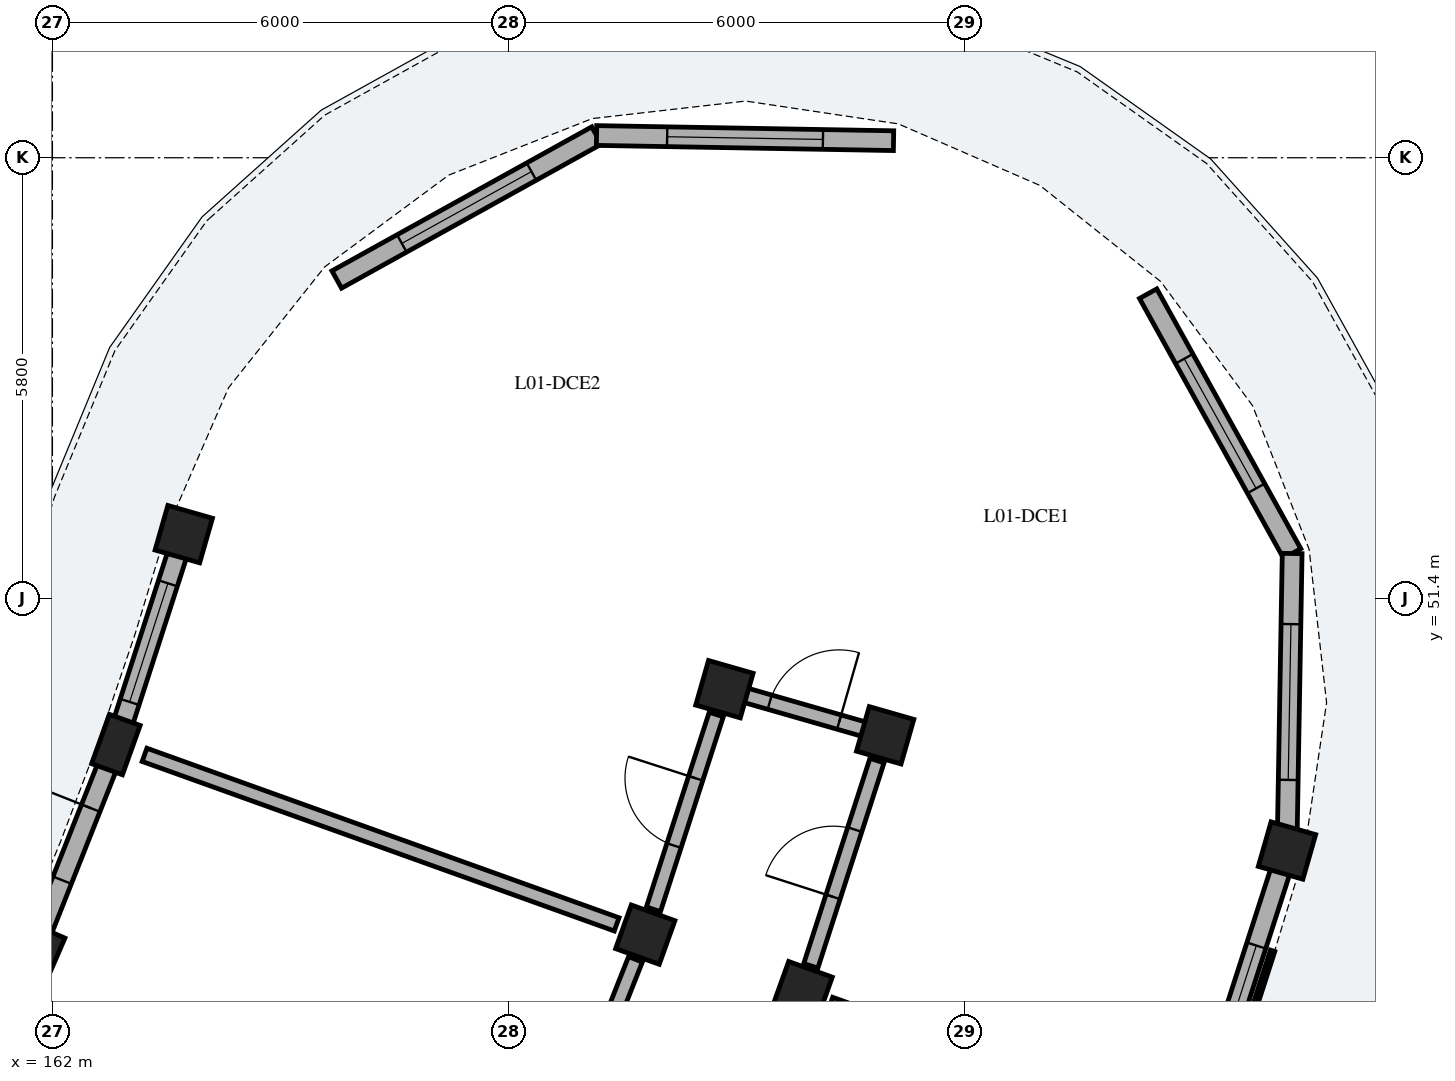
"""IFC4 building model, lengths in metres.
Left out: names, types, materials, properties, quantities, classifications, styles, units other than length and angle.
Written with IfcOpenShell. Run it as: python <this file> out.ifc"""

import sys

from ifc_helpers import new_model, si_unit, direction, frame, frame_2d, origin, origin_2d, place, context, subcontext, project, spatial, rectangle, extrude, element, fill, save


model = new_model("IFC4")
c1 = context("Model", 3, precision=1e-05, world=origin(), true_north=direction((0.0, 1.0)))
c2 = subcontext(c1, "Body", "Model", "MODEL_VIEW")
j1 = project(units=[si_unit("LENGTHUNIT", "METRE"), si_unit("PLANEANGLEUNIT", "RADIAN")], contexts=[c1])
p1 = place(None, origin())
s1 = spatial("IfcSite", under=j1, at=p1, CompositionType="ELEMENT")
p2 = place(p1, origin())
s2 = spatial("IfcBuilding", under=s1, at=p2, CompositionType="ELEMENT")
p3 = place(p2, frame((0.0, 0.0, 4.76)))
s3 = spatial("IfcBuildingStorey", under=s2, at=p3, CompositionType="ELEMENT", Elevation=4.76)
p4 = place(p3, frame((161.763, 46.776, 0.0), z_axis=(0.0, 0.0, 1.0), x_axis=(0.917060074385, -0.398749068925, 0.0)))
e1 = element("IfcColumn", 1, at=p4, inside=s3, PredefinedType="COLUMN", context=c2, shape_type="SweptSolid", body=[
    extrude(rectangle(XDim=0.61, YDim=0.61, at=origin_2d()), origin(), (0.0, 0.0, 1.0), 3.825),
])
p5 = place(p3, frame((162.835, 49.479, 0.0), z_axis=(0.0, 0.0, 1.0), x_axis=(0.941176015256, -0.337916718003, 0.0)))
e2 = element("IfcColumn", 2, at=p5, inside=s3, PredefinedType="PILASTER", context=c2, shape_type="SweptSolid", body=[
    extrude(rectangle(XDim=0.43, YDim=0.69, at=origin_2d()), origin(), (0.0, 0.0, 1.0), 3.825),
])
for number, where, z_axis, x_axis in (
    (3, (169.8, 46.979, 0.0), (0.0, 0.0, 1.0), (0.941, -0.338, 0.0)),
    (4, (171.871, 46.236, 0.0), (0.0, 0.0, 1.0), (0.941, -0.338, 0.0)),
    (5, (163.728, 52.248, 0.0), (0.0, 0.0, 1.0), (0.961, -0.276, 0.0)),
    (6, (170.841, 50.208, 0.0), (0.0, 0.0, 1.0), (0.961, -0.276, 0.0)),
    (7, (172.956, 49.602, 0.0), (0.0, 0.0, 1.0), (0.961, -0.276, 0.0)),
    (8, (178.243, 48.086, 0.0), (0.0, 0.0, 1.0), (0.961, -0.276, 0.0)),
):
    element("IfcColumn", number, at=place(p3, frame(where, z_axis=z_axis, x_axis=x_axis)), inside=s3, PredefinedType="COLUMN", context=c2, shape_type="SweptSolid", body=[
        extrude(rectangle(XDim=0.61, YDim=0.61, at=origin_2d()), origin(), (0.0, 0.0, 1.0), 3.825),
    ])
p6 = place(p3, frame((161.865, 47.031, 0.0), z_axis=(0.0, 0.0, 1.0), x_axis=(0.368500941406, 0.92962737491, 0.0)))
e9 = element("IfcWall", 9, at=p6, inside=s3, PredefinedType="SOLIDWALL", context=c2, shape_type="SweptSolid", body=[
    extrude(rectangle(XDim=2.449, YDim=0.26, at=frame_2d((1.224, 0.0))), origin(), (0.0, 0.0, 1.0), 3.075),
])
p7 = place(p6, frame((0.714, 0.0, 0.0)))
e10 = element("IfcOpeningElement", 10, at=p7, cuts=e9, PredefinedType="OPENING", context=c2, shape_type="SweptSolid", body=[
    extrude(rectangle(XDim=1.02, YDim=2.14, at=frame_2d((0.51, 1.07))), frame((0.0, 0.14, 0.0), z_axis=(0.0, -1.0, 0.0), x_axis=(1.0, 0.0, 0.0)), (0.0, 0.0, 1.0), 0.28),
])
p8 = place(p3, frame((177.104, 44.553, 0.0), z_axis=(0.0, 0.0, 1.0), x_axis=(0.306963342814, 0.951721338506, 0.0)))
e11 = element("IfcWall", 11, at=p8, inside=s3, PredefinedType="SOLIDWALL", context=c2, shape_type="SweptSolid", body=[
    extrude(rectangle(XDim=3.437, YDim=0.26, at=frame_2d((1.718, 0.0))), origin(), (0.0, 0.0, 1.0), 3.075),
])
p9 = place(p8, frame((1.038, 0.0, 0.55)))
e12 = element("IfcOpeningElement", 12, at=p9, cuts=e11, PredefinedType="OPENING", context=c2, shape_type="SweptSolid", body=[
    extrude(rectangle(XDim=1.36, YDim=1.61, at=frame_2d((0.68, 0.805))), frame((0.0, 0.14, 0.0), z_axis=(0.0, -1.0, 0.0), x_axis=(1.0, 0.0, 0.0)), (0.0, 0.0, 1.0), 0.28),
])
p10 = place(p3, frame((162.892, 49.656, 0.0), z_axis=(0.0, 0.0, 1.0), x_axis=(0.306909552229, 0.951738686169, 0.0)))
e13 = element("IfcWall", 13, at=p10, inside=s3, PredefinedType="SOLIDWALL", context=c2, shape_type="SweptSolid", body=[
    extrude(rectangle(XDim=2.448, YDim=0.26, at=frame_2d((1.224, 0.0))), origin(), (0.0, 0.0, 1.0), 3.075),
])
p11 = place(p10, frame((0.404, 0.0, 0.55)))
e14 = element("IfcOpeningElement", 14, at=p11, cuts=e13, PredefinedType="OPENING", context=c2, shape_type="SweptSolid", body=[
    extrude(rectangle(XDim=1.64, YDim=1.56, at=frame_2d((0.82, 0.78))), frame((0.0, 0.14, 0.0), z_axis=(0.0, -1.0, 0.0), x_axis=(1.0, 0.0, 0.0)), (0.0, 0.0, 1.0), 0.28),
])
p12 = place(p3, frame((165.741, 55.598, 0.0), z_axis=(0.0, 0.0, 1.0), x_axis=(0.874616555828, 0.48481530532, 0.0)))
e15 = element("IfcWall", 15, at=p12, inside=s3, PredefinedType="SOLIDWALL", context=c2, shape_type="SweptSolid", body=[
    extrude(rectangle(XDim=3.908, YDim=0.26, at=frame_2d((1.954, 0.0))), origin(), (0.0, 0.0, 1.0), 3.075),
])
p13 = place(p12, frame((0.979, 0.0, 0.4)))
e16 = element("IfcOpeningElement", 16, at=p13, cuts=e15, PredefinedType="OPENING", context=c2, shape_type="SweptSolid", body=[
    extrude(rectangle(XDim=1.95, YDim=1.78, at=frame_2d((0.975, 0.89))), frame((0.0, 0.14, 0.0), z_axis=(0.0, -1.0, 0.0), x_axis=(1.0, 0.0, 0.0)), (0.0, 0.0, 1.0), 0.28),
])
p14 = place(p3, frame((169.159, 57.493, 0.0), z_axis=(0.0, 0.0, 1.0), x_axis=(0.999847005776, -0.017491856396, 0.0)))
e17 = element("IfcWall", 17, at=p14, inside=s3, PredefinedType="SOLIDWALL", context=c2, shape_type="SweptSolid", body=[
    extrude(rectangle(XDim=3.908, YDim=0.26, at=frame_2d((1.954, 0.0))), origin(), (0.0, 0.0, 1.0), 3.075),
])
p15 = place(p14, frame((0.929, 0.0, 0.4)))
e18 = element("IfcOpeningElement", 18, at=p15, cuts=e17, PredefinedType="OPENING", context=c2, shape_type="SweptSolid", body=[
    extrude(rectangle(XDim=2.05, YDim=1.82, at=frame_2d((1.025, 0.91))), frame((0.0, 0.14, 0.0), z_axis=(0.0, -1.0, 0.0), x_axis=(1.0, 0.0, 0.0)), (0.0, 0.0, 1.0), 0.28),
])
p16 = place(p3, frame((176.417, 55.412, 0.0), z_axis=(0.0, 0.0, 1.0), x_axis=(0.48481530532, -0.874616555828, 0.0)))
e19 = element("IfcWall", 19, at=p16, inside=s3, PredefinedType="SOLIDWALL", context=c2, shape_type="SweptSolid", body=[
    extrude(rectangle(XDim=3.908, YDim=0.26, at=frame_2d((1.954, 0.0))), origin(), (0.0, 0.0, 1.0), 3.075),
])
p17 = place(p16, frame((0.979, 0.0, 0.4)))
e20 = element("IfcOpeningElement", 20, at=p17, cuts=e19, PredefinedType="OPENING", context=c2, shape_type="SweptSolid", body=[
    extrude(rectangle(XDim=1.95, YDim=1.78, at=frame_2d((0.975, 0.89))), frame((0.0, 0.14, 0.0), z_axis=(0.0, -1.0, 0.0), x_axis=(1.0, 0.0, 0.0)), (0.0, 0.0, 1.0), 0.28),
])
p18 = place(p3, frame((178.311, 51.993, 0.0), z_axis=(0.0, 0.0, 1.0), x_axis=(-0.017428315893, -0.999848115368, 0.0)))
e21 = element("IfcWall", 21, at=p18, inside=s3, PredefinedType="SOLIDWALL", context=c2, shape_type="SweptSolid", body=[
    extrude(rectangle(XDim=3.908, YDim=0.26, at=frame_2d((1.954, 0.0))), origin(), (0.0, 0.0, 1.0), 3.075),
])
p19 = place(p18, frame((0.929, 0.0, 0.4)))
e22 = element("IfcOpeningElement", 22, at=p19, cuts=e21, PredefinedType="OPENING", context=c2, shape_type="SweptSolid", body=[
    extrude(rectangle(XDim=2.05, YDim=1.82, at=frame_2d((1.025, 0.91))), frame((0.0, 0.14, 0.0), z_axis=(0.0, -1.0, 0.0), x_axis=(1.0, 0.0, 0.0)), (0.0, 0.0, 1.0), 0.28),
])
p20 = place(p3, frame((168.678, 44.15, 0.0), z_axis=(0.0, 0.0, 1.0), x_axis=(0.368528468945, 0.929616462622, 0.0)))
e23 = element("IfcWall", 23, at=p20, inside=s3, PredefinedType="PARTITIONING", context=c2, shape_type="SweptSolid", body=[
    extrude(rectangle(XDim=2.693, YDim=0.195, at=frame_2d((1.346, 0.0))), origin(), (0.0, 0.0, 1.0), 3.09),
])
p21 = place(p20, frame((0.872, 0.0, 0.0)))
e24 = element("IfcOpeningElement", 24, at=p21, cuts=e23, PredefinedType="OPENING", context=c2, shape_type="SweptSolid", body=[
    extrude(rectangle(XDim=0.95, YDim=2.13, at=frame_2d((0.475, 1.065))), frame((0.0, 0.107, 0.0), z_axis=(0.0, -1.0, 0.0), x_axis=(1.0, 0.0, 0.0)), (0.0, 0.0, 1.0), 0.215),
])
p22 = place(p3, frame((172.247, 46.1, 0.0), z_axis=(0.0, 0.0, 1.0), x_axis=(0.941182387398, -0.337898969591, 0.0)))
e25 = element("IfcWall", 25, at=p22, inside=s3, PredefinedType="PARTITIONING", context=c2, shape_type="SweptSolid", body=[
    extrude(rectangle(XDim=4.7, YDim=0.115, at=frame_2d((2.35, 0.0))), origin(), (0.0, 0.0, 1.0), 3.09),
])
p23 = place(p22, frame((1.895, 0.0, 0.0)))
e26 = element("IfcOpeningElement", 26, at=p23, cuts=e25, PredefinedType="OPENING", context=c2, shape_type="SweptSolid", body=[
    extrude(rectangle(XDim=0.91, YDim=2.1, at=frame_2d((0.455, 1.05))), frame((0.0, 0.067, 0.0), z_axis=(0.0, -1.0, 0.0), x_axis=(1.0, 0.0, 0.0)), (0.0, 0.0, 1.0), 0.135),
])
p24 = place(p3, frame((163.212, 49.344, 0.0), z_axis=(0.0, 0.0, 1.0), x_axis=(0.941179890997, -0.337905922978, 0.0)))
e27 = element("IfcWall", 27, at=p24, inside=s3, PredefinedType="PARTITIONING", context=c2, shape_type="SweptSolid", body=[
    extrude(rectangle(XDim=6.6, YDim=0.185, at=frame_2d((3.3, 0.0))), origin(), (0.0, 0.0, 1.0), 3.09),
])
p25 = place(p3, frame((171.978, 46.569, 0.0), z_axis=(0.0, 0.0, 1.0), x_axis=(0.30694495224, 0.951727269912, 0.0)))
e28 = element("IfcWall", 28, at=p25, inside=s3, PredefinedType="PARTITIONING", context=c2, shape_type="SweptSolid", body=[
    extrude(rectangle(XDim=2.837, YDim=0.195, at=frame_2d((1.418, 0.0))), origin(), (0.0, 0.0, 1.0), 3.09),
])
p26 = place(p25, frame((0.954, 0.0, 0.0)))
e29 = element("IfcOpeningElement", 29, at=p26, cuts=e28, PredefinedType="OPENING", context=c2, shape_type="SweptSolid", body=[
    extrude(rectangle(XDim=0.93, YDim=2.12, at=frame_2d((0.465, 1.06))), frame((0.0, 0.107, 0.0), z_axis=(0.0, -1.0, 0.0), x_axis=(1.0, 0.0, 0.0)), (0.0, 0.0, 1.0), 0.215),
])
p27 = place(p3, frame((169.907, 47.312, 0.0), z_axis=(0.0, 0.0, 1.0), x_axis=(0.306883578189, 0.951747061691, 0.0)))
e30 = element("IfcWall", 30, at=p27, inside=s3, PredefinedType="PARTITIONING", context=c2, shape_type="SweptSolid", body=[
    extrude(rectangle(XDim=2.693, YDim=0.195, at=frame_2d((1.346, 0.0))), origin(), (0.0, 0.0, 1.0), 3.09),
])
p28 = place(p27, frame((0.882, 0.0, 0.0)))
e31 = element("IfcOpeningElement", 31, at=p28, cuts=e30, PredefinedType="OPENING", context=c2, shape_type="SweptSolid", body=[
    extrude(rectangle(XDim=0.93, YDim=2.12, at=frame_2d((0.465, 1.06))), frame((0.0, 0.107, 0.0), z_axis=(0.0, -1.0, 0.0), x_axis=(1.0, 0.0, 0.0)), (0.0, 0.0, 1.0), 0.215),
])
p29 = place(p3, frame((170.889, 50.194, 0.0), z_axis=(0.0, 0.0, 1.0), x_axis=(0.961264701934, -0.275626872449, 0.0)))
e32 = element("IfcWall", 32, at=p29, inside=s3, PredefinedType="PARTITIONING", context=c2, shape_type="SweptSolid", body=[
    extrude(rectangle(XDim=2.1, YDim=0.195, at=frame_2d((1.05, 0.0))), origin(), (0.0, 0.0, 1.0), 3.09),
])
p30 = place(p29, frame((0.57, 0.0, 0.0)))
e33 = element("IfcOpeningElement", 33, at=p30, cuts=e32, PredefinedType="OPENING", context=c2, shape_type="SweptSolid", body=[
    extrude(rectangle(XDim=0.95, YDim=2.13, at=frame_2d((0.475, 1.065))), frame((0.0, 0.107, 0.0), z_axis=(0.0, -1.0, 0.0), x_axis=(1.0, 0.0, 0.0)), (0.0, 0.0, 1.0), 0.215),
])
p31 = place(p7, origin())
e34 = element("IfcDoor", 34, at=p31, inside=s3, OperationType="SINGLE_SWING_RIGHT", PredefinedType="DOOR", context=c2, shape_type="SweptSolid", body=[
    extrude(rectangle(XDim=1.02, YDim=2.14, at=frame_2d((0.51, 1.07))), frame((0.0, 0.025, 0.0), z_axis=(0.0, -1.0, 0.0), x_axis=(1.0, 0.0, 0.0)), (0.0, 0.0, 1.0), 0.05),
])
fill(e10, e34)
p32 = place(p9, origin())
e35 = element("IfcWindow", 35, at=p32, inside=s3, PartitioningType="SINGLE_PANEL", PredefinedType="WINDOW", context=c2, shape_type="SweptSolid", body=[
    extrude(rectangle(XDim=1.36, YDim=1.61, at=frame_2d((0.68, 0.805))), frame((0.0, 0.03, 0.0), z_axis=(0.0, -1.0, 0.0), x_axis=(1.0, 0.0, 0.0)), (0.0, 0.0, 1.0), 0.06),
])
fill(e12, e35)
p33 = place(p11, origin())
e36 = element("IfcWindow", 36, at=p33, inside=s3, PartitioningType="SINGLE_PANEL", PredefinedType="WINDOW", context=c2, shape_type="SweptSolid", body=[
    extrude(rectangle(XDim=1.64, YDim=1.56, at=frame_2d((0.82, 0.78))), frame((0.0, 0.03, 0.0), z_axis=(0.0, -1.0, 0.0), x_axis=(1.0, 0.0, 0.0)), (0.0, 0.0, 1.0), 0.06),
])
fill(e14, e36)
p34 = place(p13, origin())
e37 = element("IfcWindow", 37, at=p34, inside=s3, PartitioningType="SINGLE_PANEL", PredefinedType="WINDOW", context=c2, shape_type="SweptSolid", body=[
    extrude(rectangle(XDim=1.95, YDim=1.78, at=frame_2d((0.975, 0.89))), frame((0.0, 0.03, 0.0), z_axis=(0.0, -1.0, 0.0), x_axis=(1.0, 0.0, 0.0)), (0.0, 0.0, 1.0), 0.06),
])
fill(e16, e37)
p35 = place(p15, origin())
e38 = element("IfcWindow", 38, at=p35, inside=s3, PartitioningType="SINGLE_PANEL", PredefinedType="WINDOW", context=c2, shape_type="SweptSolid", body=[
    extrude(rectangle(XDim=2.05, YDim=1.82, at=frame_2d((1.025, 0.91))), frame((0.0, 0.03, 0.0), z_axis=(0.0, -1.0, 0.0), x_axis=(1.0, 0.0, 0.0)), (0.0, 0.0, 1.0), 0.06),
])
fill(e18, e38)
p36 = place(p17, origin())
e39 = element("IfcWindow", 39, at=p36, inside=s3, PartitioningType="SINGLE_PANEL", PredefinedType="WINDOW", context=c2, shape_type="SweptSolid", body=[
    extrude(rectangle(XDim=1.95, YDim=1.78, at=frame_2d((0.975, 0.89))), frame((0.0, 0.03, 0.0), z_axis=(0.0, -1.0, 0.0), x_axis=(1.0, 0.0, 0.0)), (0.0, 0.0, 1.0), 0.06),
])
fill(e20, e39)
p37 = place(p19, origin())
e40 = element("IfcWindow", 40, at=p37, inside=s3, PartitioningType="SINGLE_PANEL", PredefinedType="WINDOW", context=c2, shape_type="SweptSolid", body=[
    extrude(rectangle(XDim=2.05, YDim=1.82, at=frame_2d((1.025, 0.91))), frame((0.0, 0.03, 0.0), z_axis=(0.0, -1.0, 0.0), x_axis=(1.0, 0.0, 0.0)), (0.0, 0.0, 1.0), 0.06),
])
fill(e22, e40)
p38 = place(p26, origin())
e41 = element("IfcDoor", 41, at=p38, inside=s3, OperationType="SINGLE_SWING_LEFT", PredefinedType="DOOR", context=c2, shape_type="SweptSolid", body=[
    extrude(rectangle(XDim=0.93, YDim=2.12, at=frame_2d((0.465, 1.06))), frame((0.0, 0.025, 0.0), z_axis=(0.0, -1.0, 0.0), x_axis=(1.0, 0.0, 0.0)), (0.0, 0.0, 1.0), 0.05),
])
fill(e29, e41)
p39 = place(p28, origin())
e42 = element("IfcDoor", 42, at=p39, inside=s3, OperationType="SINGLE_SWING_RIGHT", PredefinedType="DOOR", context=c2, shape_type="SweptSolid", body=[
    extrude(rectangle(XDim=0.93, YDim=2.12, at=frame_2d((0.465, 1.06))), frame((0.0, 0.025, 0.0), z_axis=(0.0, -1.0, 0.0), x_axis=(1.0, 0.0, 0.0)), (0.0, 0.0, 1.0), 0.05),
])
fill(e31, e42)
p40 = place(p30, origin())
e43 = element("IfcDoor", 43, at=p40, inside=s3, OperationType="SINGLE_SWING_RIGHT", PredefinedType="DOOR", context=c2, shape_type="SweptSolid", body=[
    extrude(rectangle(XDim=0.95, YDim=2.13, at=frame_2d((0.475, 1.065))), frame((0.0, 0.025, 0.0), z_axis=(0.0, -1.0, 0.0), x_axis=(1.0, 0.0, 0.0)), (0.0, 0.0, 1.0), 0.05),
])
fill(e33, e43)
save(model, sys.argv[1])
